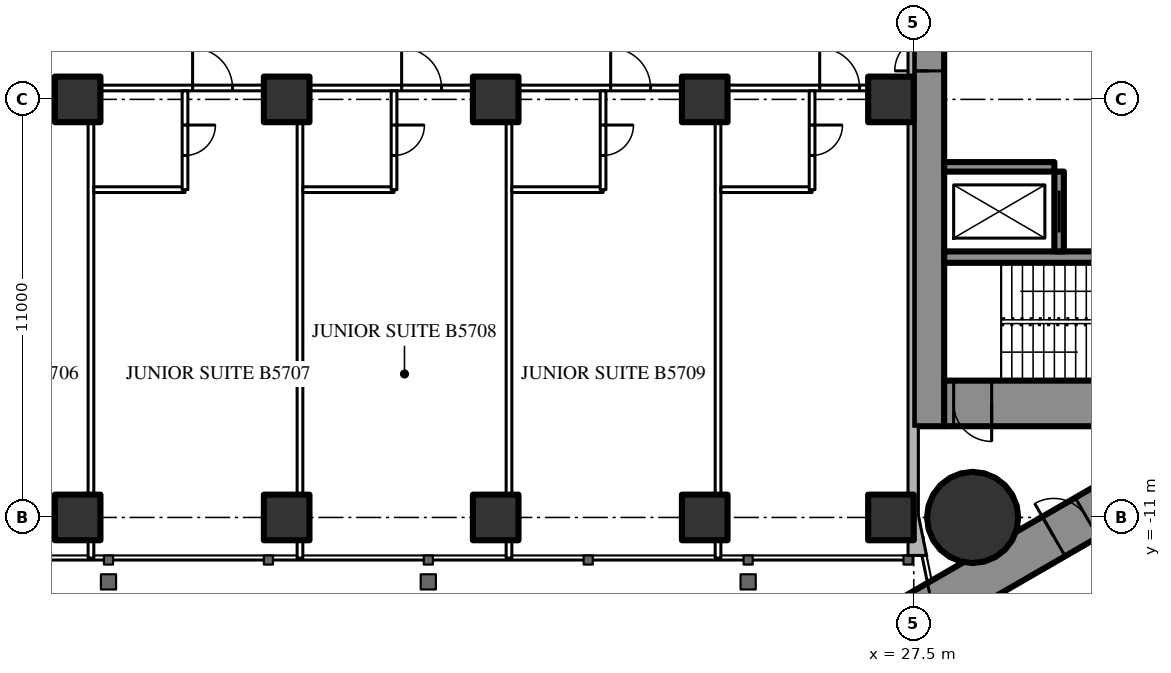
"""IFC4 building model, lengths in metres.
Left out: names, types, materials, properties, quantities, classifications, styles, units other than length and angle.
Written with IfcOpenShell. Run it as: python <this file> out.ifc"""

import sys

from ifc_helpers import new_model, si_unit, direction, frame, frame_2d, origin, origin_2d, place, context, subcontext, project, spatial, rectangle, hollow_rectangle, circle, extrude, element, fill, save


model = new_model("IFC4")
c1 = context("Model", 3, precision=1e-05, world=origin(), true_north=direction((0.0, 1.0)))
c2 = subcontext(c1, "Body", "Model", "MODEL_VIEW")
j1 = project(units=[si_unit("LENGTHUNIT", "METRE"), si_unit("PLANEANGLEUNIT", "RADIAN")], contexts=[c1])
p1 = place(None, origin())
s1 = spatial("IfcSite", under=j1, at=p1, CompositionType="ELEMENT")
p2 = place(p1, origin())
s2 = spatial("IfcBuilding", under=s1, at=p2, CompositionType="ELEMENT")
p3 = place(p2, frame((0.0, 0.0, 215.3)))
s3 = spatial("IfcBuildingStorey", under=s2, at=p3, CompositionType="ELEMENT", Elevation=215.3)
p4 = place(p3, frame((29.05, -11.0, 0.0), z_axis=(0.0, 0.0, 1.0), x_axis=(1.0, 0.0, 0.0)))
e1 = element("IfcColumn", 1, at=p4, inside=s3, PredefinedType="COLUMN", context=c2, shape_type="SweptSolid", body=[
    extrude(circle(Radius=1.2, at=origin_2d()), origin(), (0.0, 0.0, 1.0), 3.6),
])
p5 = place(p3, frame((27.9, -8.6, 0.0), z_axis=(0.0, 0.0, 1.0), x_axis=(0.0, 1.0, 0.0)))
e2 = element("IfcWall", 2, at=p5, inside=s3, PredefinedType="SHEAR", context=c2, shape_type="SweptSolid", body=[
    extrude(rectangle(XDim=17.2, YDim=0.8, at=frame_2d((8.6, 0.0))), origin(), (0.0, 0.0, 1.0), 3.6),
])
p6 = place(p5, frame((9.35, 0.0, 0.0)))
e3 = element("IfcOpeningElement", 3, at=p6, cuts=e2, PredefinedType="OPENING", context=c2, shape_type="SweptSolid", body=[
    extrude(rectangle(XDim=0.9, YDim=2.2, at=frame_2d((0.45, 1.1))), frame((0.0, 0.41, 0.0), z_axis=(0.0, -1.0, 0.0), x_axis=(1.0, 0.0, 0.0)), (0.0, 0.0, 1.0), 0.82),
])
p7 = place(p3, frame((28.3, -8.0, 0.0), z_axis=(0.0, 0.0, 1.0), x_axis=(1.0, 0.0, 0.0)))
e4 = element("IfcWall", 4, at=p7, inside=s3, PredefinedType="SHEAR", context=c2, shape_type="SweptSolid", body=[
    extrude(rectangle(XDim=8.4, YDim=1.2, at=frame_2d((4.2, 0.0))), origin(), (0.0, 0.0, 1.0), 3.6),
])
p8 = place(p7, frame((0.25, 0.0, 0.0)))
e5 = element("IfcOpeningElement", 5, at=p8, cuts=e4, PredefinedType="OPENING", context=c2, shape_type="SweptSolid", body=[
    extrude(rectangle(XDim=1.0, YDim=2.2, at=frame_2d((0.5, 1.1))), frame((0.0, 0.61, 0.0), z_axis=(0.0, -1.0, 0.0), x_axis=(1.0, 0.0, 0.0)), (0.0, 0.0, 1.0), 1.22),
])
p9 = place(p3, frame((28.3, -4.15, 0.0), z_axis=(0.0, 0.0, 1.0), x_axis=(1.0, 0.0, 0.0)))
e6 = element("IfcWall", 6, at=p9, inside=s3, PredefinedType="SHEAR", context=c2, shape_type="SweptSolid", body=[
    extrude(rectangle(XDim=8.4, YDim=0.3, at=frame_2d((4.2, 0.0))), origin(), (0.0, 0.0, 1.0), 3.6),
])
p10 = place(p3, frame((31.325, -4.0, 0.0), z_axis=(0.0, 0.0, 1.0), x_axis=(0.0, 1.0, 0.0)))
e7 = element("IfcWall", 7, at=p10, inside=s3, PredefinedType="SHEAR", context=c2, shape_type="SweptSolid", body=[
    extrude(rectangle(XDim=2.1, YDim=0.25, at=frame_2d((1.05, 0.0))), origin(), (0.0, 0.0, 1.0), 3.6),
])
p11 = place(p10, frame((0.5, 0.0, 0.0)))
e8 = element("IfcOpeningElement", 8, at=p11, cuts=e7, PredefinedType="OPENING", context=c2, shape_type="SweptSolid", body=[
    extrude(rectangle(XDim=1.1, YDim=2.2, at=frame_2d((0.55, 1.1))), frame((0.0, 0.135, 0.0), z_axis=(0.0, -1.0, 0.0), x_axis=(1.0, 0.0, 0.0)), (0.0, 0.0, 1.0), 0.27),
])
p12 = place(p3, frame((28.3, -1.775, 0.0), z_axis=(0.0, 0.0, 1.0), x_axis=(1.0, 0.0, 0.0)))
e9 = element("IfcWall", 9, at=p12, inside=s3, PredefinedType="SHEAR", context=c2, shape_type="SweptSolid", body=[
    extrude(rectangle(XDim=2.9, YDim=0.25, at=frame_2d((1.45, 0.0))), origin(), (0.0, 0.0, 1.0), 3.6),
])
p13 = place(p3, frame((27.2, -13.8, 0.0), z_axis=(0.0, 0.0, 1.0), x_axis=(0.866027159892, 0.499996958321, 0.0)))
e10 = element("IfcWall", 10, at=p13, inside=s3, PredefinedType="SHEAR", context=c2, shape_type="SweptSolid", body=[
    extrude(rectangle(XDim=27.947, YDim=1.2, at=frame_2d((13.973, 0.0))), origin(), (0.0, 0.0, 1.0), 3.6),
])
p14 = place(p13, frame((4.6, 0.0, 0.0)))
e11 = element("IfcOpeningElement", 11, at=p14, cuts=e10, PredefinedType="OPENING", context=c2, shape_type="SweptSolid", body=[
    extrude(rectangle(XDim=1.0, YDim=2.2, at=frame_2d((0.5, 1.1))), frame((0.0, 0.61, 0.0), z_axis=(0.0, -1.0, 0.0), x_axis=(1.0, 0.0, 0.0)), (0.0, 0.0, 1.0), 1.22),
])
p15 = place(p13, frame((13.395, 0.0, 0.0)))
e12 = element("IfcOpeningElement", 12, at=p15, cuts=e10, PredefinedType="OPENING", context=c2, shape_type="SweptSolid", body=[
    extrude(rectangle(XDim=1.8, YDim=2.2, at=frame_2d((0.9, 1.1))), frame((0.0, 0.61, 0.0), z_axis=(0.0, -1.0, 0.0), x_axis=(1.0, 0.0, 0.0)), (0.0, 0.0, 1.0), 1.22),
])
p16 = place(p3, frame((27.2, 13.8, 0.0), z_axis=(0.0, 0.0, 1.0), x_axis=(0.866024515034, -0.500001539357, 0.0)))
e13 = element("IfcWall", 13, at=p16, inside=s3, PredefinedType="SHEAR", context=c2, shape_type="SweptSolid", body=[
    extrude(rectangle(XDim=26.907, YDim=1.2, at=frame_2d((13.454, 0.0))), origin(), (0.0, 0.0, 1.0), 3.6),
])
p17 = place(p16, frame((4.6, 0.0, 0.0)))
e14 = element("IfcOpeningElement", 14, at=p17, cuts=e13, PredefinedType="OPENING", context=c2, shape_type="SweptSolid", body=[
    extrude(rectangle(XDim=1.0, YDim=2.2, at=frame_2d((0.5, 1.1))), frame((0.0, 0.61, 0.0), z_axis=(0.0, -1.0, 0.0), x_axis=(1.0, 0.0, 0.0)), (0.0, 0.0, 1.0), 1.22),
])
p18 = place(p16, frame((13.395, 0.0, 0.0)))
e15 = element("IfcOpeningElement", 15, at=p18, cuts=e13, PredefinedType="OPENING", context=c2, shape_type="SweptSolid", body=[
    extrude(rectangle(XDim=1.8, YDim=2.2, at=frame_2d((0.9, 1.1))), frame((0.0, 0.61, 0.0), z_axis=(0.0, -1.0, 0.0), x_axis=(1.0, 0.0, 0.0)), (0.0, 0.0, 1.0), 1.22),
])
for number, where, z_axis, x_axis in (
    (16, (5.5, -11.0, 0.0), (0.0, 0.0, 1.0), (1.0, 0.0, 0.0)),
    (17, (11.0, -11.0, 0.0), (0.0, 0.0, 1.0), (1.0, 0.0, 0.0)),
    (18, (16.5, -11.0, 0.0), (0.0, 0.0, 1.0), (1.0, 0.0, 0.0)),
    (19, (22.0, -11.0, 0.0), (0.0, 0.0, 1.0), (1.0, 0.0, 0.0)),
    (20, (26.9, -11.0, 0.0), (0.0, 0.0, 1.0), (1.0, 0.0, 0.0)),
    (21, (5.5, 0.0, 0.0), (0.0, 0.0, 1.0), (1.0, 0.0, 0.0)),
    (22, (11.0, 0.0, 0.0), (0.0, 0.0, 1.0), (1.0, 0.0, 0.0)),
    (23, (16.5, 0.0, 0.0), (0.0, 0.0, 1.0), (1.0, 0.0, 0.0)),
    (24, (22.0, 0.0, 0.0), (0.0, 0.0, 1.0), (1.0, 0.0, 0.0)),
    (25, (26.9, 0.0, 0.0), (0.0, 0.0, 1.0), (1.0, 0.0, 0.0)),
):
    element("IfcColumn", number, at=place(p3, frame(where, z_axis=z_axis, x_axis=x_axis)), inside=s3, PredefinedType="COLUMN", context=c2, shape_type="SweptSolid", body=[
        extrude(hollow_rectangle(XDim=1.2, YDim=1.2, WallThickness=0.12, at=origin_2d()), origin(), (0.0, 0.0, 1.0), 3.6),
    ])
p19 = place(p3, frame((28.959, -15.44, 0.0), z_axis=(0.0, 0.0, 1.0), x_axis=(0.866025227435, 0.500000305447, 0.0)))
e26 = element("IfcWall", 26, at=p19, inside=s3, PredefinedType="PARTITIONING", context=c2, shape_type="SweptSolid", body=[
    extrude(rectangle(XDim=30.88, YDim=0.2, at=frame_2d((15.44, 0.0))), origin(), (0.0, 0.0, 1.0), 3.35),
])
p20 = place(p19, frame((0.494, 0.0, 0.0)))
e27 = element("IfcOpeningElement", 27, at=p20, cuts=e26, PredefinedType="OPENING", context=c2, shape_type="SweptSolid", body=[
    extrude(rectangle(XDim=1.8, YDim=2.2, at=frame_2d((0.9, 1.1))), frame((0.0, 0.11, 0.0), z_axis=(0.0, -1.0, 0.0), x_axis=(1.0, 0.0, 0.0)), (0.0, 0.0, 1.0), 0.22),
])
p21 = place(p19, frame((7.687, 0.0, 0.0)))
e28 = element("IfcOpeningElement", 28, at=p21, cuts=e26, PredefinedType="OPENING", context=c2, shape_type="SweptSolid", body=[
    extrude(rectangle(XDim=1.0, YDim=2.2, at=frame_2d((0.5, 1.1))), frame((0.0, 0.11, 0.0), z_axis=(0.0, -1.0, 0.0), x_axis=(1.0, 0.0, 0.0)), (0.0, 0.0, 1.0), 0.22),
])
p22 = place(p19, frame((16.137, 0.0, 0.0)))
e29 = element("IfcOpeningElement", 29, at=p22, cuts=e26, PredefinedType="OPENING", context=c2, shape_type="SweptSolid", body=[
    extrude(rectangle(XDim=0.95, YDim=2.2, at=frame_2d((0.475, 1.1))), frame((0.0, 0.11, 0.0), z_axis=(0.0, -1.0, 0.0), x_axis=(1.0, 0.0, 0.0)), (0.0, 0.0, 1.0), 0.22),
])
p23 = place(p19, frame((20.021, 0.0, 0.0)))
e30 = element("IfcOpeningElement", 30, at=p23, cuts=e26, PredefinedType="OPENING", context=c2, shape_type="SweptSolid", body=[
    extrude(rectangle(XDim=0.95, YDim=2.2, at=frame_2d((0.475, 1.1))), frame((0.0, 0.11, 0.0), z_axis=(0.0, -1.0, 0.0), x_axis=(1.0, 0.0, 0.0)), (0.0, 0.0, 1.0), 0.22),
])
p24 = place(p19, frame((26.253, 0.0, 0.0)))
e31 = element("IfcOpeningElement", 31, at=p24, cuts=e26, PredefinedType="OPENING", context=c2, shape_type="SweptSolid", body=[
    extrude(rectangle(XDim=0.95, YDim=2.2, at=frame_2d((0.475, 1.1))), frame((0.0, 0.11, 0.0), z_axis=(0.0, -1.0, 0.0), x_axis=(1.0, 0.0, 0.0)), (0.0, 0.0, 1.0), 0.22),
])
p25 = place(p3, frame((-27.5, 0.3, 0.0), z_axis=(0.0, 0.0, 1.0), x_axis=(1.0, 0.0, 0.0)))
e32 = element("IfcWall", 32, at=p25, inside=s3, PredefinedType="PARTITIONING", context=c2, shape_type="SweptSolid", body=[
    extrude(rectangle(XDim=55.0, YDim=0.15, at=frame_2d((27.5, 0.0))), origin(), (0.0, 0.0, 1.0), 2.4),
])
p26 = place(p25, frame((1.575, 0.0, 0.0)))
e33 = element("IfcOpeningElement", 33, at=p26, cuts=e32, PredefinedType="OPENING", context=c2, shape_type="SweptSolid", body=[
    extrude(rectangle(XDim=1.0, YDim=2.2, at=frame_2d((0.5, 1.1))), frame((0.0, 0.085, 0.0), z_axis=(0.0, -1.0, 0.0), x_axis=(1.0, 0.0, 0.0)), (0.0, 0.0, 1.0), 0.17),
])
p27 = place(p25, frame((8.525, 0.0, 0.0)))
e34 = element("IfcOpeningElement", 34, at=p27, cuts=e32, PredefinedType="OPENING", context=c2, shape_type="SweptSolid", body=[
    extrude(rectangle(XDim=1.05, YDim=2.4, at=frame_2d((0.525, 1.2))), frame((0.0, 0.085, 0.0), z_axis=(0.0, -1.0, 0.0), x_axis=(1.0, 0.0, 0.0)), (0.0, 0.0, 1.0), 0.17),
])
p28 = place(p25, frame((14.025, 0.0, 0.0)))
e35 = element("IfcOpeningElement", 35, at=p28, cuts=e32, PredefinedType="OPENING", context=c2, shape_type="SweptSolid", body=[
    extrude(rectangle(XDim=1.05, YDim=2.4, at=frame_2d((0.525, 1.2))), frame((0.0, 0.085, 0.0), z_axis=(0.0, -1.0, 0.0), x_axis=(1.0, 0.0, 0.0)), (0.0, 0.0, 1.0), 0.17),
])
p29 = place(p25, frame((19.525, 0.0, 0.0)))
e36 = element("IfcOpeningElement", 36, at=p29, cuts=e32, PredefinedType="OPENING", context=c2, shape_type="SweptSolid", body=[
    extrude(rectangle(XDim=1.05, YDim=2.4, at=frame_2d((0.525, 1.2))), frame((0.0, 0.085, 0.0), z_axis=(0.0, -1.0, 0.0), x_axis=(1.0, 0.0, 0.0)), (0.0, 0.0, 1.0), 0.17),
])
p30 = place(p25, frame((25.025, 0.0, 0.0)))
e37 = element("IfcOpeningElement", 37, at=p30, cuts=e32, PredefinedType="OPENING", context=c2, shape_type="SweptSolid", body=[
    extrude(rectangle(XDim=1.05, YDim=2.4, at=frame_2d((0.525, 1.2))), frame((0.0, 0.085, 0.0), z_axis=(0.0, -1.0, 0.0), x_axis=(1.0, 0.0, 0.0)), (0.0, 0.0, 1.0), 0.17),
])
p31 = place(p25, frame((30.525, 0.0, 0.0)))
e38 = element("IfcOpeningElement", 38, at=p31, cuts=e32, PredefinedType="OPENING", context=c2, shape_type="SweptSolid", body=[
    extrude(rectangle(XDim=1.05, YDim=2.4, at=frame_2d((0.525, 1.2))), frame((0.0, 0.085, 0.0), z_axis=(0.0, -1.0, 0.0), x_axis=(1.0, 0.0, 0.0)), (0.0, 0.0, 1.0), 0.17),
])
p32 = place(p25, frame((36.025, 0.0, 0.0)))
e39 = element("IfcOpeningElement", 39, at=p32, cuts=e32, PredefinedType="OPENING", context=c2, shape_type="SweptSolid", body=[
    extrude(rectangle(XDim=1.05, YDim=2.4, at=frame_2d((0.525, 1.2))), frame((0.0, 0.085, 0.0), z_axis=(0.0, -1.0, 0.0), x_axis=(1.0, 0.0, 0.0)), (0.0, 0.0, 1.0), 0.17),
])
p33 = place(p25, frame((41.525, 0.0, 0.0)))
e40 = element("IfcOpeningElement", 40, at=p33, cuts=e32, PredefinedType="OPENING", context=c2, shape_type="SweptSolid", body=[
    extrude(rectangle(XDim=1.05, YDim=2.4, at=frame_2d((0.525, 1.2))), frame((0.0, 0.085, 0.0), z_axis=(0.0, -1.0, 0.0), x_axis=(1.0, 0.0, 0.0)), (0.0, 0.0, 1.0), 0.17),
])
p34 = place(p25, frame((47.025, 0.0, 0.0)))
e41 = element("IfcOpeningElement", 41, at=p34, cuts=e32, PredefinedType="OPENING", context=c2, shape_type="SweptSolid", body=[
    extrude(rectangle(XDim=1.05, YDim=2.4, at=frame_2d((0.525, 1.2))), frame((0.0, 0.085, 0.0), z_axis=(0.0, -1.0, 0.0), x_axis=(1.0, 0.0, 0.0)), (0.0, 0.0, 1.0), 0.17),
])
p35 = place(p25, frame((52.525, 0.0, 0.0)))
e42 = element("IfcOpeningElement", 42, at=p35, cuts=e32, PredefinedType="OPENING", context=c2, shape_type="SweptSolid", body=[
    extrude(rectangle(XDim=1.05, YDim=2.4, at=frame_2d((0.525, 1.2))), frame((0.0, 0.085, 0.0), z_axis=(0.0, -1.0, 0.0), x_axis=(1.0, 0.0, 0.0)), (0.0, 0.0, 1.0), 0.17),
])
for number, where, z_axis, x_axis in (
    (43, (5.85, -12.07, 0.0), (0.0, 0.0, 1.0), (0.0, 1.0, 0.0)),
    (44, (11.35, -12.07, 0.0), (0.0, 0.0, 1.0), (0.0, 1.0, 0.0)),
    (45, (16.85, -12.07, 0.0), (0.0, 0.0, 1.0), (0.0, 1.0, 0.0)),
    (46, (22.35, -12.07, 0.0), (0.0, 0.0, 1.0), (0.0, 1.0, 0.0)),
):
    element("IfcWall", number, at=place(p3, frame(where, z_axis=z_axis, x_axis=x_axis)), inside=s3, PredefinedType="PARTITIONING", context=c2, shape_type="SweptSolid", body=[
        extrude(rectangle(XDim=12.37, YDim=0.15, at=frame_2d((6.185, 0.0))), origin(), (0.0, 0.0, 1.0), 3.4),
    ])
p36 = place(p3, frame((5.925, -2.375, 0.0), z_axis=(0.0, 0.0, 1.0), x_axis=(1.0, 0.0, 0.0)))
e47 = element("IfcWall", 47, at=p36, inside=s3, PredefinedType="PARTITIONING", context=c2, shape_type="SweptSolid", body=[
    extrude(rectangle(XDim=2.4, YDim=0.15, at=frame_2d((1.2, 0.0))), origin(), (0.0, 0.0, 1.0), 3.4),
])
p37 = place(p3, frame((8.325, -2.375, 0.0), z_axis=(0.0, 0.0, 1.0), x_axis=(0.0, 1.0, 0.0)))
e48 = element("IfcWall", 48, at=p37, inside=s3, PredefinedType="PARTITIONING", context=c2, shape_type="SweptSolid", body=[
    extrude(rectangle(XDim=2.6, YDim=0.15, at=frame_2d((1.3, 0.0))), origin(), (0.0, 0.0, 1.0), 3.4),
])
p38 = place(p37, frame((0.9, 0.0, 0.0)))
e49 = element("IfcOpeningElement", 49, at=p38, cuts=e48, PredefinedType="OPENING", context=c2, shape_type="SweptSolid", body=[
    extrude(rectangle(XDim=0.8, YDim=2.2, at=frame_2d((0.4, 1.1))), frame((0.0, 0.085, 0.0), z_axis=(0.0, -1.0, 0.0), x_axis=(1.0, 0.0, 0.0)), (0.0, 0.0, 1.0), 0.17),
])
p39 = place(p3, frame((11.425, -2.375, 0.0), z_axis=(0.0, 0.0, 1.0), x_axis=(1.0, 0.0, 0.0)))
e50 = element("IfcWall", 50, at=p39, inside=s3, PredefinedType="PARTITIONING", context=c2, shape_type="SweptSolid", body=[
    extrude(rectangle(XDim=2.4, YDim=0.15, at=frame_2d((1.2, 0.0))), origin(), (0.0, 0.0, 1.0), 3.4),
])
p40 = place(p3, frame((13.825, -2.375, 0.0), z_axis=(0.0, 0.0, 1.0), x_axis=(0.0, 1.0, 0.0)))
e51 = element("IfcWall", 51, at=p40, inside=s3, PredefinedType="PARTITIONING", context=c2, shape_type="SweptSolid", body=[
    extrude(rectangle(XDim=2.6, YDim=0.15, at=frame_2d((1.3, 0.0))), origin(), (0.0, 0.0, 1.0), 3.4),
])
p41 = place(p40, frame((0.9, 0.0, 0.0)))
e52 = element("IfcOpeningElement", 52, at=p41, cuts=e51, PredefinedType="OPENING", context=c2, shape_type="SweptSolid", body=[
    extrude(rectangle(XDim=0.8, YDim=2.2, at=frame_2d((0.4, 1.1))), frame((0.0, 0.085, 0.0), z_axis=(0.0, -1.0, 0.0), x_axis=(1.0, 0.0, 0.0)), (0.0, 0.0, 1.0), 0.17),
])
p42 = place(p3, frame((16.925, -2.375, 0.0), z_axis=(0.0, 0.0, 1.0), x_axis=(1.0, 0.0, 0.0)))
e53 = element("IfcWall", 53, at=p42, inside=s3, PredefinedType="PARTITIONING", context=c2, shape_type="SweptSolid", body=[
    extrude(rectangle(XDim=2.4, YDim=0.15, at=frame_2d((1.2, 0.0))), origin(), (0.0, 0.0, 1.0), 3.4),
])
p43 = place(p3, frame((19.325, -2.375, 0.0), z_axis=(0.0, 0.0, 1.0), x_axis=(0.0, 1.0, 0.0)))
e54 = element("IfcWall", 54, at=p43, inside=s3, PredefinedType="PARTITIONING", context=c2, shape_type="SweptSolid", body=[
    extrude(rectangle(XDim=2.6, YDim=0.15, at=frame_2d((1.3, 0.0))), origin(), (0.0, 0.0, 1.0), 3.4),
])
p44 = place(p43, frame((0.9, 0.0, 0.0)))
e55 = element("IfcOpeningElement", 55, at=p44, cuts=e54, PredefinedType="OPENING", context=c2, shape_type="SweptSolid", body=[
    extrude(rectangle(XDim=0.8, YDim=2.2, at=frame_2d((0.4, 1.1))), frame((0.0, 0.085, 0.0), z_axis=(0.0, -1.0, 0.0), x_axis=(1.0, 0.0, 0.0)), (0.0, 0.0, 1.0), 0.17),
])
p45 = place(p3, frame((22.425, -2.375, 0.0), z_axis=(0.0, 0.0, 1.0), x_axis=(1.0, 0.0, 0.0)))
e56 = element("IfcWall", 56, at=p45, inside=s3, PredefinedType="PARTITIONING", context=c2, shape_type="SweptSolid", body=[
    extrude(rectangle(XDim=2.4, YDim=0.15, at=frame_2d((1.2, 0.0))), origin(), (0.0, 0.0, 1.0), 3.4),
])
p46 = place(p3, frame((24.825, -2.375, 0.0), z_axis=(0.0, 0.0, 1.0), x_axis=(0.0, 1.0, 0.0)))
e57 = element("IfcWall", 57, at=p46, inside=s3, PredefinedType="PARTITIONING", context=c2, shape_type="SweptSolid", body=[
    extrude(rectangle(XDim=2.6, YDim=0.15, at=frame_2d((1.3, 0.0))), origin(), (0.0, 0.0, 1.0), 3.4),
])
p47 = place(p46, frame((0.9, 0.0, 0.0)))
e58 = element("IfcOpeningElement", 58, at=p47, cuts=e57, PredefinedType="OPENING", context=c2, shape_type="SweptSolid", body=[
    extrude(rectangle(XDim=0.8, YDim=2.2, at=frame_2d((0.4, 1.1))), frame((0.0, 0.085, 0.0), z_axis=(0.0, -1.0, 0.0), x_axis=(1.0, 0.0, 0.0)), (0.0, 0.0, 1.0), 0.17),
])
p48 = place(p14, origin())
e59 = element("IfcDoor", 59, at=p48, inside=s3, OperationType="SINGLE_SWING_LEFT", PredefinedType="DOOR", context=c2, shape_type="SweptSolid", body=[
    extrude(rectangle(XDim=1.0, YDim=2.2, at=frame_2d((0.5, 1.1))), frame((0.0, 0.025, 0.0), z_axis=(0.0, -1.0, 0.0), x_axis=(1.0, 0.0, 0.0)), (0.0, 0.0, 1.0), 0.05),
])
fill(e11, e59)
p49 = place(p8, origin())
e60 = element("IfcDoor", 60, at=p49, inside=s3, OperationType="SINGLE_SWING_RIGHT", PredefinedType="DOOR", context=c2, shape_type="SweptSolid", body=[
    extrude(rectangle(XDim=1.0, YDim=2.2, at=frame_2d((0.5, 1.1))), frame((0.0, 0.025, 0.0), z_axis=(0.0, -1.0, 0.0), x_axis=(1.0, 0.0, 0.0)), (0.0, 0.0, 1.0), 0.05),
])
fill(e5, e60)
p50 = place(p6, origin())
e61 = element("IfcDoor", 61, at=p50, inside=s3, OperationType="SINGLE_SWING_LEFT", PredefinedType="DOOR", context=c2, shape_type="SweptSolid", body=[
    extrude(rectangle(XDim=0.9, YDim=2.2, at=frame_2d((0.45, 1.1))), frame((0.0, 0.025, 0.0), z_axis=(0.0, -1.0, 0.0), x_axis=(1.0, 0.0, 0.0)), (0.0, 0.0, 1.0), 0.05),
])
fill(e3, e61)
p51 = place(p38, origin())
e62 = element("IfcDoor", 62, at=p51, inside=s3, OperationType="SINGLE_SWING_RIGHT", PredefinedType="DOOR", context=c2, shape_type="SweptSolid", body=[
    extrude(rectangle(XDim=0.8, YDim=2.2, at=frame_2d((0.4, 1.1))), frame((0.0, 0.025, 0.0), z_axis=(0.0, -1.0, 0.0), x_axis=(1.0, 0.0, 0.0)), (0.0, 0.0, 1.0), 0.05),
])
fill(e49, e62)
p52 = place(p32, origin())
e63 = element("IfcDoor", 63, at=p52, inside=s3, OperationType="SINGLE_SWING_LEFT", PredefinedType="DOOR", context=c2, shape_type="SweptSolid", body=[
    extrude(rectangle(XDim=1.05, YDim=2.4, at=frame_2d((0.525, 1.2))), frame((0.0, 0.025, 0.0), z_axis=(0.0, -1.0, 0.0), x_axis=(1.0, 0.0, 0.0)), (0.0, 0.0, 1.0), 0.05),
])
fill(e39, e63)
p53 = place(p41, origin())
e64 = element("IfcDoor", 64, at=p53, inside=s3, OperationType="SINGLE_SWING_RIGHT", PredefinedType="DOOR", context=c2, shape_type="SweptSolid", body=[
    extrude(rectangle(XDim=0.8, YDim=2.2, at=frame_2d((0.4, 1.1))), frame((0.0, 0.025, 0.0), z_axis=(0.0, -1.0, 0.0), x_axis=(1.0, 0.0, 0.0)), (0.0, 0.0, 1.0), 0.05),
])
fill(e52, e64)
p54 = place(p33, origin())
e65 = element("IfcDoor", 65, at=p54, inside=s3, OperationType="SINGLE_SWING_LEFT", PredefinedType="DOOR", context=c2, shape_type="SweptSolid", body=[
    extrude(rectangle(XDim=1.05, YDim=2.4, at=frame_2d((0.525, 1.2))), frame((0.0, 0.025, 0.0), z_axis=(0.0, -1.0, 0.0), x_axis=(1.0, 0.0, 0.0)), (0.0, 0.0, 1.0), 0.05),
])
fill(e40, e65)
p55 = place(p44, origin())
e66 = element("IfcDoor", 66, at=p55, inside=s3, OperationType="SINGLE_SWING_RIGHT", PredefinedType="DOOR", context=c2, shape_type="SweptSolid", body=[
    extrude(rectangle(XDim=0.8, YDim=2.2, at=frame_2d((0.4, 1.1))), frame((0.0, 0.025, 0.0), z_axis=(0.0, -1.0, 0.0), x_axis=(1.0, 0.0, 0.0)), (0.0, 0.0, 1.0), 0.05),
])
fill(e55, e66)
p56 = place(p34, origin())
e67 = element("IfcDoor", 67, at=p56, inside=s3, OperationType="SINGLE_SWING_LEFT", PredefinedType="DOOR", context=c2, shape_type="SweptSolid", body=[
    extrude(rectangle(XDim=1.05, YDim=2.4, at=frame_2d((0.525, 1.2))), frame((0.0, 0.025, 0.0), z_axis=(0.0, -1.0, 0.0), x_axis=(1.0, 0.0, 0.0)), (0.0, 0.0, 1.0), 0.05),
])
fill(e41, e67)
p57 = place(p47, origin())
e68 = element("IfcDoor", 68, at=p57, inside=s3, OperationType="SINGLE_SWING_RIGHT", PredefinedType="DOOR", context=c2, shape_type="SweptSolid", body=[
    extrude(rectangle(XDim=0.8, YDim=2.2, at=frame_2d((0.4, 1.1))), frame((0.0, 0.025, 0.0), z_axis=(0.0, -1.0, 0.0), x_axis=(1.0, 0.0, 0.0)), (0.0, 0.0, 1.0), 0.05),
])
fill(e58, e68)
p58 = place(p35, origin())
e69 = element("IfcDoor", 69, at=p58, inside=s3, OperationType="SINGLE_SWING_LEFT", PredefinedType="DOOR", context=c2, shape_type="SweptSolid", body=[
    extrude(rectangle(XDim=1.05, YDim=2.4, at=frame_2d((0.525, 1.2))), frame((0.0, 0.025, 0.0), z_axis=(0.0, -1.0, 0.0), x_axis=(1.0, 0.0, 0.0)), (0.0, 0.0, 1.0), 0.05),
])
fill(e42, e69)
p59 = place(p11, origin())
e70 = element("IfcDoor", 70, at=p59, inside=s3, OperationType="SLIDING_TO_LEFT", PredefinedType="USERDEFINED", context=c2, shape_type="SweptSolid", body=[
    extrude(rectangle(XDim=1.1, YDim=2.2, at=frame_2d((0.55, 1.1))), frame((0.0, 0.025, 0.0), z_axis=(0.0, -1.0, 0.0), x_axis=(1.0, 0.0, 0.0)), (0.0, 0.0, 1.0), 0.05),
])
fill(e8, e70)
save(model, sys.argv[1])
